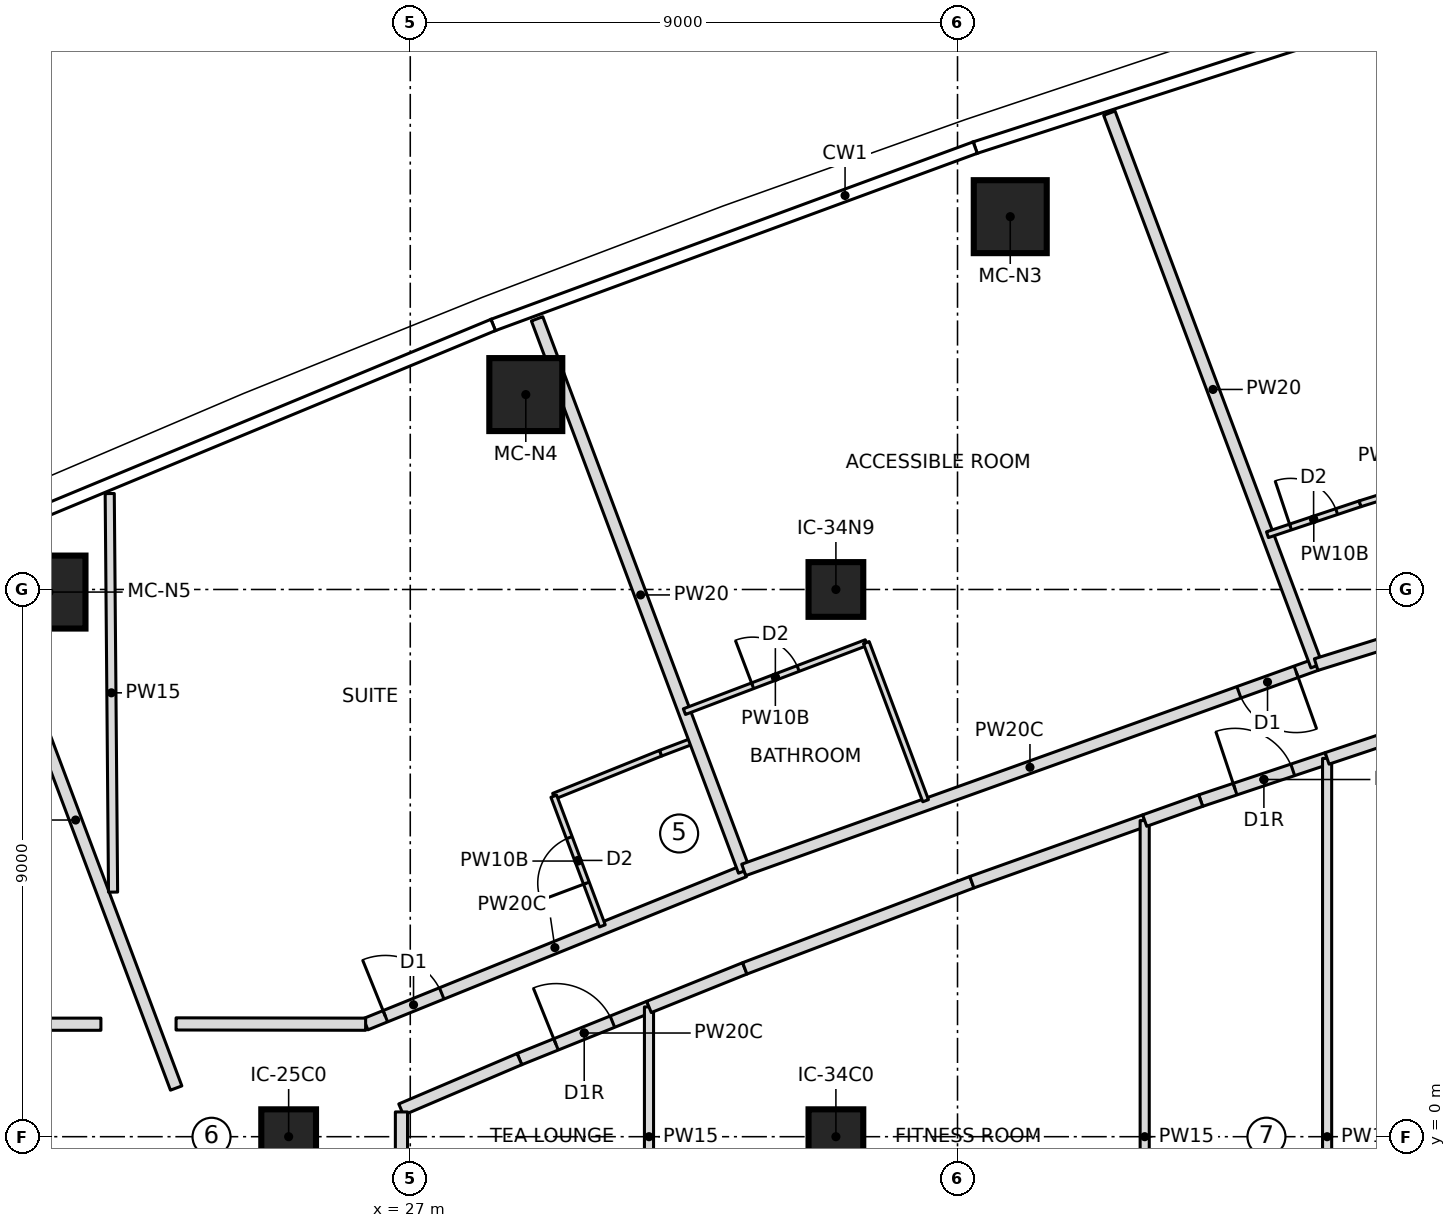
"""IFC4 building model, lengths in metres.
Left out: names, types, materials, properties, quantities, classifications, styles, units other than length and angle.
Written with IfcOpenShell. Run it as: python <this file> out.ifc"""

import sys

from ifc_helpers import new_model, si_unit, direction, frame, frame_2d, origin, origin_2d, place, context, subcontext, project, spatial, rectangle, extrude, element, fill, save


model = new_model("IFC4")
c1 = context("Model", 3, precision=1e-05, world=origin(), true_north=direction((0.0, 1.0)))
c2 = subcontext(c1, "Body", "Model", "MODEL_VIEW")
j1 = project(units=[si_unit("LENGTHUNIT", "METRE"), si_unit("PLANEANGLEUNIT", "RADIAN")], contexts=[c1])
p1 = place(None, origin())
s1 = spatial("IfcSite", under=j1, at=p1, CompositionType="ELEMENT")
p2 = place(p1, origin())
s2 = spatial("IfcBuilding", under=s1, at=p2, CompositionType="ELEMENT")
p3 = place(p2, frame((0.0, 0.0, 231.45)))
s3 = spatial("IfcBuildingStorey", under=s2, at=p3, CompositionType="ELEMENT", Elevation=231.45)
for number, where, z_axis, x_axis in (
    (1, (36.867, 15.132, 0.0), (0.0, 0.0, 1.0), (1.0, 0.0, 0.0)),
    (2, (28.9, 12.205, 0.0), (0.0, 0.0, 1.0), (1.0, 0.0, 0.0)),
    (3, (21.059, 8.958, 0.0), (0.0, 0.0, 1.0), (1.0, 0.0, 0.0)),
):
    element("IfcColumn", number, at=place(p3, frame(where, z_axis=z_axis, x_axis=x_axis)), inside=s3, PredefinedType="COLUMN", context=c2, shape_type="SweptSolid", body=[
        extrude(rectangle(XDim=1.2, YDim=1.2, at=origin_2d()), origin(), (0.0, 0.0, 1.0), 3.55),
    ])
for number, where, z_axis, x_axis in (
    (4, (25.0, 0.0, 0.0), (0.0, 0.0, 1.0), (1.0, 0.0, 0.0)),
    (5, (34.0, 0.0, 0.0), (0.0, 0.0, 1.0), (1.0, 0.0, 0.0)),
    (6, (34.0, 9.0, 0.0), (0.0, 0.0, 1.0), (1.0, 0.0, 0.0)),
):
    element("IfcColumn", number, at=place(p3, frame(where, z_axis=z_axis, x_axis=x_axis)), inside=s3, PredefinedType="COLUMN", context=c2, shape_type="SweptSolid", body=[
        extrude(rectangle(XDim=0.9, YDim=0.9, at=origin_2d()), origin(), (0.0, 0.0, 1.0), 3.55),
    ])
p4 = place(p3, frame((13.052, 1.85, 0.0), z_axis=(0.0, 0.0, 1.0), x_axis=(1.0, 0.0, 0.0)))
e7 = element("IfcWall", 7, at=p4, inside=s3, PredefinedType="PARTITIONING", context=c2, shape_type="SweptSolid", body=[
    extrude(rectangle(XDim=8.861, YDim=0.2, at=frame_2d((4.43, 0.0))), origin(), (0.0, 0.0, 1.0), 3.25),
])
p5 = place(p4, frame((3.93, 0.0, 0.0)))
e8 = element("IfcOpeningElement", 8, at=p5, cuts=e7, PredefinedType="OPENING", context=c2, shape_type="SweptSolid", body=[
    extrude(rectangle(XDim=1.0, YDim=2.1, at=frame_2d((0.5, 1.05))), frame((0.0, 0.11, 0.0), z_axis=(0.0, -1.0, 0.0), x_axis=(1.0, 0.0, 0.0)), (0.0, 0.0, 1.0), 0.22),
])
p6 = place(p3, frame((23.15, 0.8, 0.0), z_axis=(0.0, 0.0, 1.0), x_axis=(-0.351123441588, 0.936329177569, 0.0)))
e9 = element("IfcWall", 9, at=p6, inside=s3, PredefinedType="PARTITIONING", context=c2, shape_type="SweptSolid", body=[
    extrude(rectangle(XDim=9.416, YDim=0.2, at=frame_2d((4.708, 0.0))), origin(), (0.0, 0.0, 1.0), 3.25),
])
p7 = place(p3, frame((26.266, 1.85, 0.0), z_axis=(0.0, 0.0, 1.0), x_axis=(0.927007906702, 0.375041785555, 0.0)))
e10 = element("IfcWall", 10, at=p7, inside=s3, PredefinedType="PARTITIONING", context=c2, shape_type="SweptSolid", body=[
    extrude(rectangle(XDim=6.716, YDim=0.2, at=frame_2d((3.358, 0.0))), origin(), (0.0, 0.0, 1.0), 3.25),
])
p8 = place(p7, frame((0.35, 0.0, 0.0)))
e11 = element("IfcOpeningElement", 11, at=p8, cuts=e10, PredefinedType="OPENING", context=c2, shape_type="SweptSolid", body=[
    extrude(rectangle(XDim=1.0, YDim=2.1, at=frame_2d((0.5, 1.05))), frame((0.0, 0.11, 0.0), z_axis=(0.0, -1.0, 0.0), x_axis=(1.0, 0.0, 0.0)), (0.0, 0.0, 1.0), 0.22),
])
p9 = place(p3, frame((29.36, 5.6, 0.0), z_axis=(0.0, 0.0, 1.0), x_axis=(0.927594225674, 0.373589283166, 0.0)))
e12 = element("IfcWall", 12, at=p9, inside=s3, PredefinedType="PARTITIONING", context=c2, shape_type="SweptSolid", body=[
    extrude(rectangle(XDim=1.895, YDim=0.1, at=frame_2d((0.947, 0.0))), origin(), (0.0, 0.0, 1.0), 3.25),
])
p10 = place(p3, frame((31.117, 6.308, 0.0), z_axis=(0.0, 0.0, 1.0), x_axis=(0.935048188903, 0.354520640342, 0.0)))
e13 = element("IfcWall", 13, at=p10, inside=s3, PredefinedType="PARTITIONING", context=c2, shape_type="SweptSolid", body=[
    extrude(rectangle(XDim=0.606, YDim=0.1, at=frame_2d((0.303, 0.0))), origin(), (0.0, 0.0, 1.0), 3.25),
])
p11 = place(p3, frame((30.16, 3.467, 0.0), z_axis=(0.0, 0.0, 1.0), x_axis=(-0.351158682313, 0.936315961541, 0.0)))
e14 = element("IfcWall", 14, at=p11, inside=s3, PredefinedType="PARTITIONING", context=c2, shape_type="SweptSolid", body=[
    extrude(rectangle(XDim=2.278, YDim=0.1, at=frame_2d((1.139, 0.0))), origin(), (0.0, 0.0, 1.0), 3.25),
])
p12 = place(p11, frame((0.75, 0.0, 0.0)))
e15 = element("IfcOpeningElement", 15, at=p12, cuts=e14, PredefinedType="OPENING", context=c2, shape_type="SweptSolid", body=[
    extrude(rectangle(XDim=0.8, YDim=2.1, at=frame_2d((0.4, 1.05))), frame((0.0, 0.06, 0.0), z_axis=(0.0, -1.0, 0.0), x_axis=(1.0, 0.0, 0.0)), (0.0, 0.0, 1.0), 0.12),
])
p13 = place(p3, frame((32.492, 4.369, 0.0), z_axis=(0.0, 0.0, 1.0), x_axis=(-0.351128958016, 0.93632710889, 0.0)))
e16 = element("IfcWall", 16, at=p13, inside=s3, PredefinedType="PARTITIONING", context=c2, shape_type="SweptSolid", body=[
    extrude(rectangle(XDim=9.7, YDim=0.2, at=frame_2d((4.85, 0.0))), origin(), (0.0, 0.0, 1.0), 3.25),
])
p14 = place(p3, frame((41.898, 7.764, 0.0), z_axis=(0.0, 0.0, 1.0), x_axis=(-0.941277643829, -0.337633525034, 0.0)))
e17 = element("IfcWall", 17, at=p14, inside=s3, PredefinedType="PARTITIONING", context=c2, shape_type="SweptSolid", body=[
    extrude(rectangle(XDim=10.001, YDim=0.2, at=frame_2d((5.0, 0.0))), origin(), (0.0, 0.0, 1.0), 3.25),
])
p15 = place(p14, frame((0.35, 0.0, 0.0)))
e18 = element("IfcOpeningElement", 18, at=p15, cuts=e17, PredefinedType="OPENING", context=c2, shape_type="SweptSolid", body=[
    extrude(rectangle(XDim=1.0, YDim=2.1, at=frame_2d((0.5, 1.05))), frame((0.0, 0.11, 0.0), z_axis=(0.0, -1.0, 0.0), x_axis=(1.0, 0.0, 0.0)), (0.0, 0.0, 1.0), 0.22),
])
p16 = place(p3, frame((31.509, 6.991, 0.0), z_axis=(0.0, 0.0, 1.0), x_axis=(0.934948661714, 0.354783032232, 0.0)))
e19 = element("IfcWall", 19, at=p16, inside=s3, PredefinedType="PARTITIONING", context=c2, shape_type="SweptSolid", body=[
    extrude(rectangle(XDim=3.2, YDim=0.1, at=frame_2d((1.6, 0.0))), origin(), (0.0, 0.0, 1.0), 3.25),
])
p17 = place(p16, frame((1.2, 0.0, 0.0)))
e20 = element("IfcOpeningElement", 20, at=p17, cuts=e19, PredefinedType="OPENING", context=c2, shape_type="SweptSolid", body=[
    extrude(rectangle(XDim=0.8, YDim=2.1, at=frame_2d((0.4, 1.05))), frame((0.0, 0.06, 0.0), z_axis=(0.0, -1.0, 0.0), x_axis=(1.0, 0.0, 0.0)), (0.0, 0.0, 1.0), 0.12),
])
p18 = place(p3, frame((34.5, 8.126, 0.0), z_axis=(0.0, 0.0, 1.0), x_axis=(0.351065630332, -0.936350854755, 0.0)))
e21 = element("IfcWall", 21, at=p18, inside=s3, PredefinedType="PARTITIONING", context=c2, shape_type="SweptSolid", body=[
    extrude(rectangle(XDim=2.777, YDim=0.1, at=frame_2d((1.388, 0.0))), origin(), (0.0, 0.0, 1.0), 3.25),
])
p19 = place(p3, frame((41.906, 7.746, 0.0), z_axis=(0.0, 0.0, 1.0), x_axis=(-0.35112895446, 0.936327110224, 0.0)))
e22 = element("IfcWall", 22, at=p19, inside=s3, PredefinedType="PARTITIONING", context=c2, shape_type="SweptSolid", body=[
    extrude(rectangle(XDim=9.706, YDim=0.2, at=frame_2d((4.853, 0.0))), origin(), (0.0, 0.0, 1.0), 3.25),
])
p20 = place(p3, frame((41.097, 9.901, 0.0), z_axis=(0.0, 0.0, 1.0), x_axis=(0.948485479965, 0.3168206027, 0.0)))
e23 = element("IfcWall", 23, at=p20, inside=s3, PredefinedType="PARTITIONING", context=c2, shape_type="SweptSolid", body=[
    extrude(rectangle(XDim=1.606, YDim=0.1, at=frame_2d((0.803, 0.0))), origin(), (0.0, 0.0, 1.0), 3.25),
])
p21 = place(p20, frame((0.4, 0.0, 0.0)))
e24 = element("IfcOpeningElement", 24, at=p21, cuts=e23, PredefinedType="OPENING", context=c2, shape_type="SweptSolid", body=[
    extrude(rectangle(XDim=0.8, YDim=2.1, at=frame_2d((0.4, 1.05))), frame((0.0, 0.06, 0.0), z_axis=(0.0, -1.0, 0.0), x_axis=(1.0, 0.0, 0.0)), (0.0, 0.0, 1.0), 0.12),
])
p22 = place(p3, frame((42.621, 10.409, 0.0), z_axis=(0.0, 0.0, 1.0), x_axis=(0.954618903587, 0.297830067176, 0.0)))
e25 = element("IfcWall", 25, at=p22, inside=s3, PredefinedType="PARTITIONING", context=c2, shape_type="SweptSolid", body=[
    extrude(rectangle(XDim=0.531, YDim=0.1, at=frame_2d((0.266, 0.0))), origin(), (0.0, 0.0, 1.0), 3.25),
])
p23 = place(p3, frame((28.796, 1.276, 0.0), z_axis=(0.0, 0.0, 1.0), x_axis=(0.927609077038, 0.373552406224, 0.0)))
e26 = element("IfcWall", 26, at=p23, inside=s3, PredefinedType="PARTITIONING", context=c2, shape_type="SweptSolid", body=[
    extrude(rectangle(XDim=2.297, YDim=0.2, at=frame_2d((1.148, 0.0))), origin(), (0.0, 0.0, 1.0), 3.25),
])
p24 = place(p23, frame((0.648, 0.0, 0.0)))
e27 = element("IfcOpeningElement", 27, at=p24, cuts=e26, PredefinedType="OPENING", context=c2, shape_type="SweptSolid", body=[
    extrude(rectangle(XDim=1.0, YDim=2.1, at=frame_2d((0.5, 1.05))), frame((0.0, 0.11, 0.0), z_axis=(0.0, -1.0, 0.0), x_axis=(1.0, 0.0, 0.0)), (0.0, 0.0, 1.0), 0.22),
])
p25 = place(p3, frame((26.85, 0.447, 0.0), z_axis=(0.0, 0.0, 1.0), x_axis=(0.91990756443, 0.392135273732, 0.0)))
e28 = element("IfcWall", 28, at=p25, inside=s3, PredefinedType="PARTITIONING", context=c2, shape_type="SweptSolid", body=[
    extrude(rectangle(XDim=2.115, YDim=0.2, at=frame_2d((1.058, 0.0))), origin(), (0.0, 0.0, 1.0), 3.25),
])
p26 = place(p3, frame((30.926, -2.134, 0.0), z_axis=(0.0, 0.0, 1.0), x_axis=(0.0, 1.0, 0.0)))
e29 = element("IfcWall", 29, at=p26, inside=s3, PredefinedType="PARTITIONING", context=c2, shape_type="SweptSolid", body=[
    extrude(rectangle(XDim=4.268, YDim=0.15, at=frame_2d((2.134, 0.0))), origin(), (0.0, 0.0, 1.0), 3.25),
])
p27 = place(p3, frame((30.926, 2.134, 0.0), z_axis=(0.0, 0.0, 1.0), x_axis=(0.927641577565, 0.373471690456, 0.0)))
e30 = element("IfcWall", 30, at=p27, inside=s3, PredefinedType="PARTITIONING", context=c2, shape_type="SweptSolid", body=[
    extrude(rectangle(XDim=1.698, YDim=0.2, at=frame_2d((0.849, 0.0))), origin(), (0.0, 0.0, 1.0), 3.25),
])
p28 = place(p3, frame((32.501, 2.768, 0.0), z_axis=(0.0, 0.0, 1.0), x_axis=(0.934950696546, 0.354777669856, 0.0)))
e31 = element("IfcWall", 31, at=p28, inside=s3, PredefinedType="PARTITIONING", context=c2, shape_type="SweptSolid", body=[
    extrude(rectangle(XDim=3.995, YDim=0.2, at=frame_2d((1.997, 0.0))), origin(), (0.0, 0.0, 1.0), 3.25),
])
p29 = place(p3, frame((36.236, 4.186, 0.0), z_axis=(0.0, 0.0, 1.0), x_axis=(0.941908381697, 0.335869916023, 0.0)))
e32 = element("IfcWall", 32, at=p29, inside=s3, PredefinedType="PARTITIONING", context=c2, shape_type="SweptSolid", body=[
    extrude(rectangle(XDim=3.017, YDim=0.2, at=frame_2d((1.509, 0.0))), origin(), (0.0, 0.0, 1.0), 3.25),
])
p30 = place(p3, frame((39.078, -5.199, 0.0), z_axis=(0.0, 0.0, 1.0), x_axis=(0.0, 1.0, 0.0)))
e33 = element("IfcWall", 33, at=p30, inside=s3, PredefinedType="PARTITIONING", context=c2, shape_type="SweptSolid", body=[
    extrude(rectangle(XDim=10.398, YDim=0.15, at=frame_2d((5.199, 0.0))), origin(), (0.0, 0.0, 1.0), 3.25),
])
p31 = place(p3, frame((39.999, 5.527, 0.0), z_axis=(0.0, 0.0, 1.0), x_axis=(0.9484714727, 0.316862534034, 0.0)))
e34 = element("IfcWall", 34, at=p31, inside=s3, PredefinedType="PARTITIONING", context=c2, shape_type="SweptSolid", body=[
    extrude(rectangle(XDim=2.192, YDim=0.2, at=frame_2d((1.096, 0.0))), origin(), (0.0, 0.0, 1.0), 3.25),
])
p32 = place(p31, frame((0.596, 0.0, 0.0)))
e35 = element("IfcOpeningElement", 35, at=p32, cuts=e34, PredefinedType="OPENING", context=c2, shape_type="SweptSolid", body=[
    extrude(rectangle(XDim=1.0, YDim=2.1, at=frame_2d((0.5, 1.05))), frame((0.0, 0.11, 0.0), z_axis=(0.0, -1.0, 0.0), x_axis=(1.0, 0.0, 0.0)), (0.0, 0.0, 1.0), 0.22),
])
p33 = place(p3, frame((39.078, 5.199, 0.0), z_axis=(0.0, 0.0, 1.0), x_axis=(0.941911279377, 0.335861789704, 0.0)))
e36 = element("IfcWall", 36, at=p33, inside=s3, PredefinedType="PARTITIONING", context=c2, shape_type="SweptSolid", body=[
    extrude(rectangle(XDim=0.978, YDim=0.2, at=frame_2d((0.489, 0.0))), origin(), (0.0, 0.0, 1.0), 3.25),
])
p34 = place(p3, frame((42.078, -6.222, 0.0), z_axis=(0.0, 0.0, 1.0), x_axis=(0.0, 1.0, 0.0)))
e37 = element("IfcWall", 37, at=p34, inside=s3, PredefinedType="PARTITIONING", context=c2, shape_type="SweptSolid", body=[
    extrude(rectangle(XDim=12.444, YDim=0.15, at=frame_2d((6.222, 0.0))), origin(), (0.0, 0.0, 1.0), 3.25),
])
p35 = place(p3, frame((42.078, 6.222, 0.0), z_axis=(0.0, 0.0, 1.0), x_axis=(0.948466406859, 0.316877697323, 0.0)))
e38 = element("IfcWall", 38, at=p35, inside=s3, PredefinedType="PARTITIONING", context=c2, shape_type="SweptSolid", body=[
    extrude(rectangle(XDim=1.803, YDim=0.2, at=frame_2d((0.901, 0.0))), origin(), (0.0, 0.0, 1.0), 3.25),
])
p36 = place(p3, frame((22.057, 10.578, 0.0), z_axis=(0.0, 0.0, 1.0), x_axis=(0.008379594055, -0.999964890585, 0.0)))
e39 = element("IfcWall", 39, at=p36, inside=s3, PredefinedType="PARTITIONING", context=c2, shape_type="SweptSolid", body=[
    extrude(rectangle(XDim=6.555, YDim=0.15, at=frame_2d((3.278, 0.0))), origin(), (0.0, 0.0, 1.0), 3.25),
])
p37 = place(p3, frame((41.898, 7.764, 0.0), z_axis=(0.0, 0.0, 1.0), x_axis=(0.954667015156, 0.297675813886, 0.0)))
e40 = element("IfcWall", 40, at=p37, inside=s3, PredefinedType="PARTITIONING", context=c2, shape_type="SweptSolid", body=[
    extrude(rectangle(XDim=6.706, YDim=0.2, at=frame_2d((3.353, 0.0))), origin(), (0.0, 0.0, 1.0), 3.25),
])
p38 = place(p37, frame((3.95, 0.0, 0.0)))
e41 = element("IfcOpeningElement", 41, at=p38, cuts=e40, PredefinedType="OPENING", context=c2, shape_type="SweptSolid", body=[
    extrude(rectangle(XDim=1.5, YDim=2.1, at=frame_2d((0.75, 1.05))), frame((0.0, 0.11, 0.0), z_axis=(0.0, -1.0, 0.0), x_axis=(1.0, 0.0, 0.0)), (0.0, 0.0, 1.0), 0.22),
])
p39 = place(p3, frame((26.855, -0.407, 0.0), z_axis=(0.0, 0.0, 1.0), x_axis=(0.0, 1.0, 0.0)))
e42 = element("IfcWall", 42, at=p39, inside=s3, PredefinedType="PARTITIONING", context=c2, shape_type="SweptSolid", body=[
    extrude(rectangle(XDim=0.814, YDim=0.2, at=frame_2d((0.407, 0.0))), origin(), (0.0, 0.0, 1.0), 3.25),
])
p40 = place(p3, frame((26.266, 1.85, 0.0), z_axis=(0.0, 0.0, 1.0), x_axis=(-0.999998892962, 0.001487977051, 0.0)))
e43 = element("IfcWall", 43, at=p40, inside=s3, PredefinedType="PARTITIONING", context=c2, shape_type="SweptSolid", body=[
    extrude(rectangle(XDim=3.117, YDim=0.2, at=frame_2d((1.559, 0.0))), origin(), (0.0, 0.0, 1.0), 3.25),
])
p41 = place(p12, origin())
e44 = element("IfcDoor", 44, at=p41, inside=s3, OperationType="SINGLE_SWING_LEFT", PredefinedType="DOOR", context=c2, shape_type="SweptSolid", body=[
    extrude(rectangle(XDim=0.8, YDim=2.1, at=frame_2d((0.4, 1.05))), frame((0.0, 0.025, 0.0), z_axis=(0.0, -1.0, 0.0), x_axis=(1.0, 0.0, 0.0)), (0.0, 0.0, 1.0), 0.05),
])
fill(e15, e44)
p42 = place(p8, origin())
e45 = element("IfcDoor", 45, at=p42, inside=s3, OperationType="SINGLE_SWING_LEFT", PredefinedType="DOOR", context=c2, shape_type="SweptSolid", body=[
    extrude(rectangle(XDim=1.0, YDim=2.1, at=frame_2d((0.5, 1.05))), frame((0.0, 0.025, 0.0), z_axis=(0.0, -1.0, 0.0), x_axis=(1.0, 0.0, 0.0)), (0.0, 0.0, 1.0), 0.05),
])
fill(e11, e45)
p43 = place(p17, origin())
e46 = element("IfcDoor", 46, at=p43, inside=s3, OperationType="SINGLE_SWING_LEFT", PredefinedType="DOOR", context=c2, shape_type="SweptSolid", body=[
    extrude(rectangle(XDim=0.8, YDim=2.1, at=frame_2d((0.4, 1.05))), frame((0.0, 0.025, 0.0), z_axis=(0.0, -1.0, 0.0), x_axis=(1.0, 0.0, 0.0)), (0.0, 0.0, 1.0), 0.05),
])
fill(e20, e46)
p44 = place(p15, origin())
e47 = element("IfcDoor", 47, at=p44, inside=s3, OperationType="SINGLE_SWING_LEFT", PredefinedType="DOOR", context=c2, shape_type="SweptSolid", body=[
    extrude(rectangle(XDim=1.0, YDim=2.1, at=frame_2d((0.5, 1.05))), frame((0.0, 0.025, 0.0), z_axis=(0.0, -1.0, 0.0), x_axis=(1.0, 0.0, 0.0)), (0.0, 0.0, 1.0), 0.05),
])
fill(e18, e47)
p45 = place(p21, origin())
e48 = element("IfcDoor", 48, at=p45, inside=s3, OperationType="SINGLE_SWING_LEFT", PredefinedType="DOOR", context=c2, shape_type="SweptSolid", body=[
    extrude(rectangle(XDim=0.8, YDim=2.1, at=frame_2d((0.4, 1.05))), frame((0.0, 0.025, 0.0), z_axis=(0.0, -1.0, 0.0), x_axis=(1.0, 0.0, 0.0)), (0.0, 0.0, 1.0), 0.05),
])
fill(e24, e48)
p46 = place(p24, origin())
e49 = element("IfcDoor", 49, at=p46, inside=s3, OperationType="SINGLE_SWING_RIGHT", PredefinedType="DOOR", context=c2, shape_type="SweptSolid", body=[
    extrude(rectangle(XDim=1.0, YDim=2.1, at=frame_2d((0.5, 1.05))), frame((0.0, 0.025, 0.0), z_axis=(0.0, -1.0, 0.0), x_axis=(1.0, 0.0, 0.0)), (0.0, 0.0, 1.0), 0.05),
])
fill(e27, e49)
p47 = place(p32, origin())
e50 = element("IfcDoor", 50, at=p47, inside=s3, OperationType="SINGLE_SWING_RIGHT", PredefinedType="DOOR", context=c2, shape_type="SweptSolid", body=[
    extrude(rectangle(XDim=1.0, YDim=2.1, at=frame_2d((0.5, 1.05))), frame((0.0, 0.025, 0.0), z_axis=(0.0, -1.0, 0.0), x_axis=(1.0, 0.0, 0.0)), (0.0, 0.0, 1.0), 0.05),
])
fill(e35, e50)
save(model, sys.argv[1])
